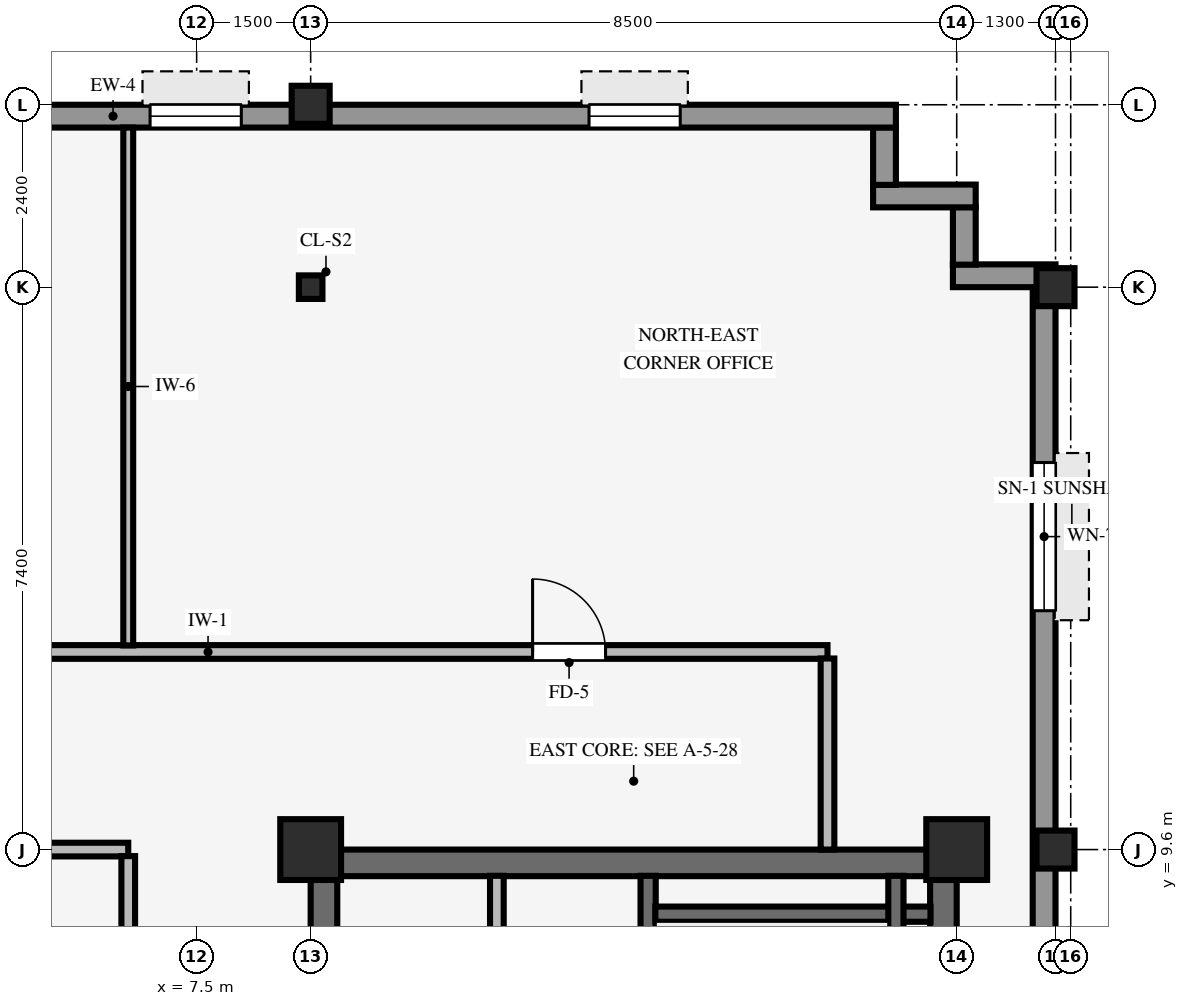
"""IFC4 building model, lengths in metres.
Left out: names, types, materials, properties, quantities, classifications, styles, units other than length and angle.
Written with IfcOpenShell. Run it as: python <this file> out.ifc"""

import sys

from ifc_helpers import new_model, si_unit, direction, frame, frame_2d, origin, origin_2d, place, context, subcontext, project, spatial, rectangle, hollow_rectangle, i_section, extrude, source, transform, mapped, element, fill, save


model = new_model("IFC4")
c1 = context("Model", 3, precision=1e-05, world=origin(), true_north=direction((0.0, 1.0)))
c2 = subcontext(c1, "Body", "Model", "MODEL_VIEW")
j1 = project(units=[si_unit("LENGTHUNIT", "METRE"), si_unit("PLANEANGLEUNIT", "RADIAN")], contexts=[c1])
p1 = place(None, origin())
s1 = spatial("IfcSite", under=j1, at=p1, CompositionType="ELEMENT")
p2 = place(p1, origin())
s2 = spatial("IfcBuilding", under=s1, at=p2, CompositionType="ELEMENT")
p3 = place(p2, frame((0.0, 0.0, 238.35)))
s3 = spatial("IfcBuildingStorey", under=s2, at=p3, CompositionType="ELEMENT", Elevation=238.35)
p4 = place(p3, frame((9.0, 9.425, 0.0), z_axis=(0.0, 0.0, 1.0), x_axis=(1.0, 0.0, 0.0)))
e1 = element("IfcWall", 1, at=p4, inside=s3, PredefinedType="SHEAR", context=c2, shape_type="SweptSolid", body=[
    extrude(rectangle(XDim=8.5, YDim=0.35, at=frame_2d((4.25, 0.0))), origin(), (0.0, 0.0, 1.0), 3.37),
])
p5 = place(p3, frame((9.175, -9.255, 0.0), z_axis=(0.0, 0.0, 1.0), x_axis=(0.0, 1.0, 0.0)))
e2 = element("IfcWall", 2, at=p5, inside=s3, PredefinedType="SHEAR", context=c2, shape_type="SweptSolid", body=[
    extrude(rectangle(XDim=18.51, YDim=0.35, at=frame_2d((9.255, 0.0))), origin(), (0.0, 0.0, 1.0), 3.37),
])
p6 = place(p5, frame((8.655, 0.0, 0.0)))
e3 = element("IfcOpeningElement", 3, at=p6, cuts=e2, PredefinedType="OPENING", context=c2, shape_type="SweptSolid", body=[
    extrude(rectangle(XDim=1.2, YDim=2.15, at=frame_2d((0.6, 1.075))), frame((0.0, 0.185, 0.0), z_axis=(0.0, -1.0, 0.0), x_axis=(1.0, 0.0, 0.0)), (0.0, 0.0, 1.0), 0.37),
])
p7 = place(p3, frame((17.325, -9.255, 0.0), z_axis=(0.0, 0.0, 1.0), x_axis=(0.0, 1.0, 0.0)))
e4 = element("IfcWall", 4, at=p7, inside=s3, PredefinedType="SHEAR", context=c2, shape_type="SweptSolid", body=[
    extrude(rectangle(XDim=18.51, YDim=0.35, at=frame_2d((9.255, 0.0))), origin(), (0.0, 0.0, 1.0), 3.37),
])
for number, where, z_axis, x_axis in (
    (5, (9.0, 9.6, 0.0), (0.0, 0.0, 1.0), (1.0, 0.0, 0.0)),
    (6, (17.5, 9.6, 0.0), (0.0, 0.0, 1.0), (1.0, 0.0, 0.0)),
):
    element("IfcColumn", number, at=place(p3, frame(where, z_axis=z_axis, x_axis=x_axis)), inside=s3, PredefinedType="COLUMN", context=c2, shape_type="SweptSolid", body=[
        extrude(rectangle(XDim=0.8, YDim=0.8, at=origin_2d()), origin(), (0.0, 0.0, 1.0), 3.37),
    ])
for number, where, z_axis, x_axis in (
    (7, (18.8, 9.6, 0.0), (0.0, 0.0, 1.0), (1.0, 0.0, 0.0)),
    (8, (18.8, 17.0, 0.0), (0.0, 0.0, 1.0), (1.0, 0.0, 0.0)),
    (9, (9.0, 19.4, 0.0), (0.0, 0.0, 1.0), (1.0, 0.0, 0.0)),
):
    element("IfcColumn", number, at=place(p3, frame(where, z_axis=z_axis, x_axis=x_axis)), inside=s3, PredefinedType="COLUMN", context=c2, shape_type="SweptSolid", body=[
        extrude(hollow_rectangle(XDim=0.5, YDim=0.5, WallThickness=0.032, InnerFilletRadius=0.032, OuterFilletRadius=0.064, at=origin_2d()), origin(), (0.0, 0.0, 1.0), 3.37),
    ])
p8 = place(p3, frame((9.0, 17.0, 0.0), z_axis=(0.0, 0.0, 1.0), x_axis=(1.0, 0.0, 0.0)))
e10 = element("IfcColumn", 10, at=p8, inside=s3, PredefinedType="COLUMN", context=c2, shape_type="SweptSolid", body=[
    extrude(i_section(OverallWidth=0.31, OverallDepth=0.31, WebThickness=0.015, FlangeThickness=0.015, FilletRadius=0.015, at=origin_2d()), origin(), (0.0, 0.0, 1.0), 3.37),
])
p9 = place(p3, frame((18.65, -17.004, 0.0), z_axis=(0.0, 0.0, 1.0), x_axis=(0.0, 1.0, 0.0)))
e11 = element("IfcWall", 11, at=p9, inside=s3, PredefinedType="STANDARD", context=c2, shape_type="SweptSolid", body=[
    extrude(rectangle(XDim=34.008, YDim=0.3, at=frame_2d((17.004, 0.0))), origin(), (0.0, 0.0, 1.0), 2.705),
])
p10 = place(p9, frame((2.311, 0.0, 0.8)))
e12 = element("IfcOpeningElement", 12, at=p10, cuts=e11, PredefinedType="OPENING", context=c2, shape_type="SweptSolid", body=[
    extrude(rectangle(XDim=1.95, YDim=1.48, at=frame_2d((0.975, 0.74))), frame((0.0, 0.16, 0.0), z_axis=(0.0, -1.0, 0.0), x_axis=(1.0, 0.0, 0.0)), (0.0, 0.0, 1.0), 0.32),
])
p11 = place(p9, frame((29.747, 0.0, 0.8)))
e13 = element("IfcOpeningElement", 13, at=p11, cuts=e11, PredefinedType="OPENING", context=c2, shape_type="SweptSolid", body=[
    extrude(rectangle(XDim=1.95, YDim=1.48, at=frame_2d((0.975, 0.74))), frame((0.0, 0.16, 0.0), z_axis=(0.0, -1.0, 0.0), x_axis=(1.0, 0.0, 0.0)), (0.0, 0.0, 1.0), 0.32),
])
p12 = place(p3, frame((17.45, 17.15, 0.0), z_axis=(0.0, 0.0, 1.0), x_axis=(1.0, 0.0, 0.0)))
e14 = element("IfcWall", 14, at=p12, inside=s3, PredefinedType="STANDARD", context=c2, shape_type="SweptSolid", body=[
    extrude(rectangle(XDim=1.35, YDim=0.3, at=frame_2d((0.675, 0.0))), origin(), (0.0, 0.0, 1.0), 2.892),
])
p13 = place(p3, frame((17.6, 17.296, 0.0), z_axis=(0.0, 0.0, 1.0), x_axis=(0.0, 1.0, 0.0)))
e15 = element("IfcWall", 15, at=p13, inside=s3, PredefinedType="STANDARD", context=c2, shape_type="SweptSolid", body=[
    extrude(rectangle(XDim=0.758, YDim=0.3, at=frame_2d((0.379, 0.0))), origin(), (0.0, 0.0, 1.0), 2.892),
])
p14 = place(p3, frame((16.4, 18.2, 0.0), z_axis=(0.0, 0.0, 1.0), x_axis=(1.0, 0.0, 0.0)))
e16 = element("IfcWall", 16, at=p14, inside=s3, PredefinedType="STANDARD", context=c2, shape_type="SweptSolid", body=[
    extrude(rectangle(XDim=1.35, YDim=0.3, at=frame_2d((0.675, 0.0))), origin(), (0.0, 0.0, 1.0), 2.892),
])
p15 = place(p3, frame((16.55, 18.346, 0.0), z_axis=(0.0, 0.0, 1.0), x_axis=(0.0, 1.0, 0.0)))
e17 = element("IfcWall", 17, at=p15, inside=s3, PredefinedType="STANDARD", context=c2, shape_type="SweptSolid", body=[
    extrude(rectangle(XDim=0.758, YDim=0.3, at=frame_2d((0.379, 0.0))), origin(), (0.0, 0.0, 1.0), 2.892),
])
p16 = place(p3, frame((-24.3, 19.25, 0.0), z_axis=(0.0, 0.0, 1.0), x_axis=(1.0, 0.0, 0.0)))
e18 = element("IfcWall", 18, at=p16, inside=s3, PredefinedType="STANDARD", context=c2, shape_type="SweptSolid", body=[
    extrude(rectangle(XDim=41.0, YDim=0.3, at=frame_2d((20.5, 0.0))), origin(), (0.0, 0.0, 1.0), 2.705),
])
p17 = place(p16, frame((18.9, 0.0, 0.0)))
e19 = element("IfcOpeningElement", 19, at=p17, cuts=e18, PredefinedType="OPENING", context=c2, shape_type="SweptSolid", body=[
    extrude(rectangle(XDim=1.05, YDim=2.1, at=frame_2d((0.525, 1.05))), frame((0.0, 0.16, 0.0), z_axis=(0.0, -1.0, 0.0), x_axis=(1.0, 0.0, 0.0)), (0.0, 0.0, 1.0), 0.32),
])
p18 = place(p16, frame((2.837, 0.0, 0.8)))
e20 = element("IfcOpeningElement", 20, at=p18, cuts=e18, PredefinedType="OPENING", context=c2, shape_type="SweptSolid", body=[
    extrude(rectangle(XDim=1.2, YDim=1.48, at=frame_2d((0.6, 0.74))), frame((0.0, 0.16, 0.0), z_axis=(0.0, -1.0, 0.0), x_axis=(1.0, 0.0, 0.0)), (0.0, 0.0, 1.0), 0.32),
])
p19 = place(p16, frame((7.712, 0.0, 0.8)))
e21 = element("IfcOpeningElement", 21, at=p19, cuts=e18, PredefinedType="OPENING", context=c2, shape_type="SweptSolid", body=[
    extrude(rectangle(XDim=1.2, YDim=1.48, at=frame_2d((0.6, 0.74))), frame((0.0, 0.16, 0.0), z_axis=(0.0, -1.0, 0.0), x_axis=(1.0, 0.0, 0.0)), (0.0, 0.0, 1.0), 0.32),
])
p20 = place(p16, frame((12.587, 0.0, 0.8)))
e22 = element("IfcOpeningElement", 22, at=p20, cuts=e18, PredefinedType="OPENING", context=c2, shape_type="SweptSolid", body=[
    extrude(rectangle(XDim=1.2, YDim=1.48, at=frame_2d((0.6, 0.74))), frame((0.0, 0.16, 0.0), z_axis=(0.0, -1.0, 0.0), x_axis=(1.0, 0.0, 0.0)), (0.0, 0.0, 1.0), 0.32),
])
p21 = place(p16, frame((16.113, 0.0, 0.8)))
e23 = element("IfcOpeningElement", 23, at=p21, cuts=e18, PredefinedType="OPENING", context=c2, shape_type="SweptSolid", body=[
    extrude(rectangle(XDim=1.2, YDim=1.48, at=frame_2d((0.6, 0.74))), frame((0.0, 0.16, 0.0), z_axis=(0.0, -1.0, 0.0), x_axis=(1.0, 0.0, 0.0)), (0.0, 0.0, 1.0), 0.32),
])
p22 = place(p16, frame((21.887, 0.0, 0.8)))
e24 = element("IfcOpeningElement", 24, at=p22, cuts=e18, PredefinedType="OPENING", context=c2, shape_type="SweptSolid", body=[
    extrude(rectangle(XDim=1.2, YDim=1.48, at=frame_2d((0.6, 0.74))), frame((0.0, 0.16, 0.0), z_axis=(0.0, -1.0, 0.0), x_axis=(1.0, 0.0, 0.0)), (0.0, 0.0, 1.0), 0.32),
])
p23 = place(p16, frame((27.212, 0.0, 0.8)))
e25 = element("IfcOpeningElement", 25, at=p23, cuts=e18, PredefinedType="OPENING", context=c2, shape_type="SweptSolid", body=[
    extrude(rectangle(XDim=1.2, YDim=1.48, at=frame_2d((0.6, 0.74))), frame((0.0, 0.16, 0.0), z_axis=(0.0, -1.0, 0.0), x_axis=(1.0, 0.0, 0.0)), (0.0, 0.0, 1.0), 0.32),
])
p24 = place(p16, frame((31.188, 0.0, 0.8)))
e26 = element("IfcOpeningElement", 26, at=p24, cuts=e18, PredefinedType="OPENING", context=c2, shape_type="SweptSolid", body=[
    extrude(rectangle(XDim=1.2, YDim=1.48, at=frame_2d((0.6, 0.74))), frame((0.0, 0.16, 0.0), z_axis=(0.0, -1.0, 0.0), x_axis=(1.0, 0.0, 0.0)), (0.0, 0.0, 1.0), 0.32),
])
p25 = place(p16, frame((36.962, 0.0, 0.8)))
e27 = element("IfcOpeningElement", 27, at=p25, cuts=e18, PredefinedType="OPENING", context=c2, shape_type="SweptSolid", body=[
    extrude(rectangle(XDim=1.2, YDim=1.48, at=frame_2d((0.6, 0.74))), frame((0.0, 0.16, 0.0), z_axis=(0.0, -1.0, 0.0), x_axis=(1.0, 0.0, 0.0)), (0.0, 0.0, 1.0), 0.32),
])
p26 = place(p3, frame((13.44, 0.9, 0.0), z_axis=(0.0, 0.0, 1.0), x_axis=(0.0, 1.0, 0.0)))
e28 = element("IfcWall", 28, at=p26, inside=s3, PredefinedType="SHEAR", context=c2, shape_type="SweptSolid", body=[
    extrude(rectangle(XDim=8.355, YDim=0.2, at=frame_2d((4.177, 0.0))), origin(), (0.0, 0.0, 1.0), 3.37),
])
p27 = place(p26, frame((0.43, 0.0, 0.0)))
e29 = element("IfcOpeningElement", 29, at=p27, cuts=e28, PredefinedType="OPENING", context=c2, shape_type="SweptSolid", body=[
    extrude(rectangle(XDim=1.1, YDim=2.15, at=frame_2d((0.55, 1.075))), frame((0.0, 0.11, 0.0), z_axis=(0.0, -1.0, 0.0), x_axis=(1.0, 0.0, 0.0)), (0.0, 0.0, 1.0), 0.22),
])
p28 = place(p3, frame((13.535, 8.75, 0.0), z_axis=(0.0, 0.0, 1.0), x_axis=(1.0, 0.0, 0.0)))
e30 = element("IfcWall", 30, at=p28, inside=s3, PredefinedType="SHEAR", context=c2, shape_type="SweptSolid", body=[
    extrude(rectangle(XDim=3.62, YDim=0.2, at=frame_2d((1.81, 0.0))), origin(), (0.0, 0.0, 1.0), 3.37),
])
p29 = place(p3, frame((16.7, 1.095, 0.0), z_axis=(0.0, 0.0, 1.0), x_axis=(0.0, 1.0, 0.0)))
e31 = element("IfcWall", 31, at=p29, inside=s3, PredefinedType="SHEAR", context=c2, shape_type="SweptSolid", body=[
    extrude(rectangle(XDim=8.16, YDim=0.2, at=frame_2d((4.08, 0.0))), origin(), (0.0, 0.0, 1.0), 3.37),
])
p30 = place(p3, frame((11.45, 4.19, 0.0), z_axis=(0.0, 0.0, 1.0), x_axis=(0.0, 1.0, 0.0)))
e32 = element("IfcWall", 32, at=p30, inside=s3, PredefinedType="PARTITIONING", context=c2, shape_type="SweptSolid", body=[
    extrude(rectangle(XDim=5.065, YDim=0.18, at=frame_2d((2.532, 0.0))), origin(), (0.0, 0.0, 1.0), 3.36),
])
p31 = place(p3, frame((0.151, 9.6, 0.0), z_axis=(0.0, 0.0, 1.0), x_axis=(1.0, 0.0, 0.0)))
e33 = element("IfcWall", 33, at=p31, inside=s3, PredefinedType="PARTITIONING", context=c2, shape_type="SweptSolid", body=[
    extrude(rectangle(XDim=6.449, YDim=0.18, at=frame_2d((3.225, 0.0))), origin(), (0.0, 0.0, 1.0), 2.405),
])
p32 = place(p3, frame((-9.0, 12.2, 0.0), z_axis=(0.0, 0.0, 1.0), x_axis=(1.0, 0.0, 0.0)))
e34 = element("IfcWall", 34, at=p32, inside=s3, PredefinedType="PARTITIONING", context=c2, shape_type="SweptSolid", body=[
    extrude(rectangle(XDim=24.8, YDim=0.18, at=frame_2d((12.4, 0.0))), origin(), (0.0, 0.0, 1.0), 3.36),
])
p33 = place(p32, frame((11.42, 0.0, 0.0)))
e35 = element("IfcOpeningElement", 35, at=p33, cuts=e34, PredefinedType="OPENING", context=c2, shape_type="SweptSolid", body=[
    extrude(rectangle(XDim=0.96, YDim=2.1, at=frame_2d((0.48, 1.05))), frame((0.0, 0.1, 0.0), z_axis=(0.0, -1.0, 0.0), x_axis=(1.0, 0.0, 0.0)), (0.0, 0.0, 1.0), 0.2),
])
p34 = place(p32, frame((20.92, 0.0, 0.0)))
e36 = element("IfcOpeningElement", 36, at=p34, cuts=e34, PredefinedType="OPENING", context=c2, shape_type="SweptSolid", body=[
    extrude(rectangle(XDim=0.96, YDim=2.1, at=frame_2d((0.48, 1.05))), frame((0.0, 0.1, 0.0), z_axis=(0.0, -1.0, 0.0), x_axis=(1.0, 0.0, 0.0)), (0.0, 0.0, 1.0), 0.2),
])
p35 = place(p32, frame((4.82, 0.0, 0.0)))
e37 = element("IfcOpeningElement", 37, at=p35, cuts=e34, PredefinedType="OPENING", context=c2, shape_type="SweptSolid", body=[
    extrude(rectangle(XDim=0.96, YDim=2.1, at=frame_2d((0.48, 1.05))), frame((0.0, 0.1, 0.0), z_axis=(0.0, -1.0, 0.0), x_axis=(1.0, 0.0, 0.0)), (0.0, 0.0, 1.0), 0.2),
])
p36 = place(p32, frame((0.75, 0.0, 0.0)))
e38 = element("IfcOpeningElement", 38, at=p36, cuts=e34, PredefinedType="OPENING", context=c2, shape_type="SweptSolid", body=[
    extrude(rectangle(XDim=0.9, YDim=2.1, at=frame_2d((0.45, 1.05))), frame((0.0, 0.1, 0.0), z_axis=(0.0, -1.0, 0.0), x_axis=(1.0, 0.0, 0.0)), (0.0, 0.0, 1.0), 0.2),
])
p37 = place(p3, frame((6.6, 1.336, 0.0), z_axis=(0.0, 0.0, 1.0), x_axis=(0.0, 1.0, 0.0)))
e39 = element("IfcWall", 39, at=p37, inside=s3, PredefinedType="PARTITIONING", context=c2, shape_type="SweptSolid", body=[
    extrude(rectangle(XDim=8.178, YDim=0.18, at=frame_2d((4.089, 0.0))), origin(), (0.0, 0.0, 1.0), 3.36),
])
p38 = place(p3, frame((6.6, 12.286, 0.0), z_axis=(0.0, 0.0, 1.0), x_axis=(0.0, 1.0, 0.0)))
e40 = element("IfcWall", 40, at=p38, inside=s3, PredefinedType="PARTITIONING", context=c2, shape_type="SweptSolid", body=[
    extrude(rectangle(XDim=6.814, YDim=0.13, at=frame_2d((3.407, 0.0))), origin(), (0.0, 0.0, 1.0), 3.36),
])
p39 = place(p3, frame((15.8, 9.6, 0.0), z_axis=(0.0, 0.0, 1.0), x_axis=(0.0, 1.0, 0.0)))
e41 = element("IfcWall", 41, at=p39, inside=s3, PredefinedType="PARTITIONING", context=c2, shape_type="SweptSolid", body=[
    extrude(rectangle(XDim=2.514, YDim=0.18, at=frame_2d((1.257, 0.0))), origin(), (0.0, 0.0, 1.0), 3.36),
])
m1 = source(origin(), c2, "Body", "SweptSolid", [
    extrude(rectangle(XDim=1.95, YDim=1.48, at=frame_2d((0.975, 0.74))), frame((0.0, 0.03, 0.0), z_axis=(0.0, -1.0, 0.0), x_axis=(1.0, 0.0, 0.0)), (0.0, 0.0, 1.0), 0.06),
])
p40 = place(p11, origin())
e42 = element("IfcWindow", 42, at=p40, inside=s3, PartitioningType="SINGLE_PANEL", PredefinedType="WINDOW", context=c2, shape_type="MappedRepresentation", body=[
    mapped(m1, transform((0.0, 0.0, 0.0), scale=1.0)),
])
fill(e13, e42)
m2 = source(origin(), c2, "Body", "SweptSolid", [
    extrude(rectangle(XDim=1.2, YDim=1.48, at=frame_2d((0.6, 0.74))), frame((0.0, 0.03, 0.0), z_axis=(0.0, -1.0, 0.0), x_axis=(1.0, 0.0, 0.0)), (0.0, 0.0, 1.0), 0.06),
])
p41 = place(p24, origin())
e43 = element("IfcWindow", 43, at=p41, inside=s3, PartitioningType="SINGLE_PANEL", PredefinedType="WINDOW", context=c2, shape_type="MappedRepresentation", body=[
    mapped(m2, transform((0.0, 0.0, 0.0), scale=1.0)),
])
fill(e26, e43)
p42 = place(p25, origin())
e44 = element("IfcWindow", 44, at=p42, inside=s3, PartitioningType="SINGLE_PANEL", PredefinedType="WINDOW", context=c2, shape_type="MappedRepresentation", body=[
    mapped(m2, transform((0.0, 0.0, 0.0), scale=1.0)),
])
fill(e27, e44)
m3 = source(origin(), c2, "Body", "SweptSolid", [
    extrude(rectangle(XDim=0.96, YDim=2.1, at=frame_2d((0.48, 1.05))), frame((0.0, 0.025, 0.0), z_axis=(0.0, -1.0, 0.0), x_axis=(1.0, 0.0, 0.0)), (0.0, 0.0, 1.0), 0.05),
])
p43 = place(p34, origin())
e45 = element("IfcDoor", 45, at=p43, inside=s3, OperationType="SINGLE_SWING_LEFT", PredefinedType="DOOR", context=c2, shape_type="MappedRepresentation", body=[
    mapped(m3, transform((0.0, 0.0, 0.0), scale=1.0)),
])
fill(e36, e45)
save(model, sys.argv[1])
